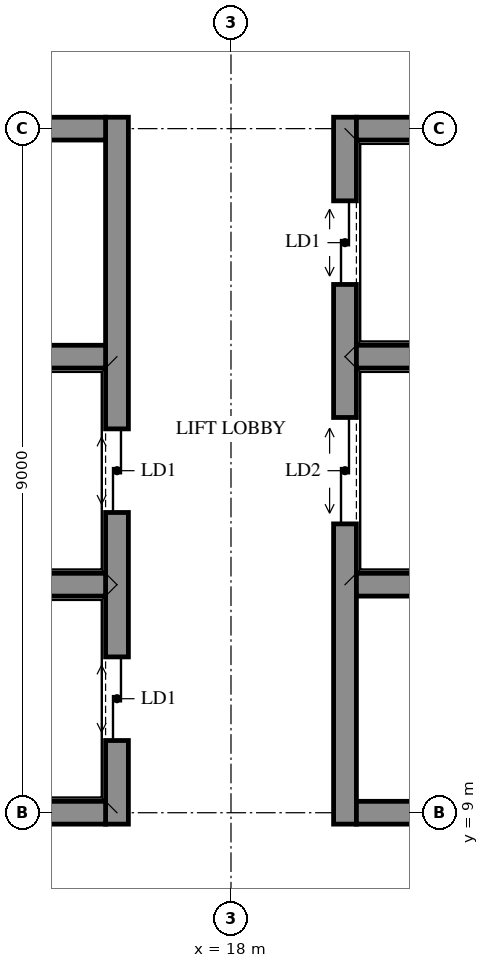
"""IFC4 building model, lengths in metres.
Left out: names, types, materials, properties, quantities, classifications, styles, units other than length and angle.
Written with IfcOpenShell. Run it as: python <this file> out.ifc"""

import sys

from ifc_helpers import new_model, si_unit, direction, frame, frame_2d, origin, place, context, subcontext, project, spatial, rectangle, extrude, element, fill, save


model = new_model("IFC4")
c1 = context("Model", 3, precision=1e-05, world=origin(), true_north=direction((0.0, 1.0)))
c2 = subcontext(c1, "Body", "Model", "MODEL_VIEW")
j1 = project(units=[si_unit("LENGTHUNIT", "METRE"), si_unit("PLANEANGLEUNIT", "RADIAN")], contexts=[c1])
p1 = place(None, origin())
s1 = spatial("IfcSite", under=j1, at=p1, CompositionType="ELEMENT")
p2 = place(p1, origin())
s2 = spatial("IfcBuilding", under=s1, at=p2, CompositionType="ELEMENT")
p3 = place(p2, frame((0.0, 0.0, 36.0)))
s3 = spatial("IfcBuildingStorey", under=s2, at=p3, CompositionType="ELEMENT", Elevation=36.0)
p4 = place(p3, frame((16.5, 8.85, 0.0), z_axis=(0.0, 0.0, 1.0), x_axis=(0.0, 1.0, 0.0)))
e1 = element("IfcWall", 1, at=p4, inside=s3, PredefinedType="SHEAR", context=c2, shape_type="SweptSolid", body=[
    extrude(rectangle(XDim=9.3, YDim=0.3, at=frame_2d((4.65, 0.0))), origin(), (0.0, 0.0, 1.0), 4.2),
])
p5 = place(p4, frame((1.1, 0.0, 0.0)))
e2 = element("IfcOpeningElement", 2, at=p5, cuts=e1, PredefinedType="OPENING", context=c2, shape_type="SweptSolid", body=[
    extrude(rectangle(XDim=1.1, YDim=2.1, at=frame_2d((0.55, 1.05))), frame((0.0, 0.16, 0.0), z_axis=(0.0, -1.0, 0.0), x_axis=(1.0, 0.0, 0.0)), (0.0, 0.0, 1.0), 0.32),
])
p6 = place(p4, frame((4.1, 0.0, 0.0)))
e3 = element("IfcOpeningElement", 3, at=p6, cuts=e1, PredefinedType="OPENING", context=c2, shape_type="SweptSolid", body=[
    extrude(rectangle(XDim=1.1, YDim=2.1, at=frame_2d((0.55, 1.05))), frame((0.0, 0.16, 0.0), z_axis=(0.0, -1.0, 0.0), x_axis=(1.0, 0.0, 0.0)), (0.0, 0.0, 1.0), 0.32),
])
p7 = place(p3, frame((19.5, 8.85, 0.0), z_axis=(0.0, 0.0, 1.0), x_axis=(0.0, 1.0, 0.0)))
e4 = element("IfcWall", 4, at=p7, inside=s3, PredefinedType="SHEAR", context=c2, shape_type="SweptSolid", body=[
    extrude(rectangle(XDim=9.3, YDim=0.3, at=frame_2d((4.65, 0.0))), origin(), (0.0, 0.0, 1.0), 4.2),
])
p8 = place(p7, frame((3.95, 0.0, 0.0)))
e5 = element("IfcOpeningElement", 5, at=p8, cuts=e4, PredefinedType="OPENING", context=c2, shape_type="SweptSolid", body=[
    extrude(rectangle(XDim=1.4, YDim=2.1, at=frame_2d((0.7, 1.05))), frame((0.0, 0.16, 0.0), z_axis=(0.0, -1.0, 0.0), x_axis=(1.0, 0.0, 0.0)), (0.0, 0.0, 1.0), 0.32),
])
p9 = place(p7, frame((7.1, 0.0, 0.0)))
e6 = element("IfcOpeningElement", 6, at=p9, cuts=e4, PredefinedType="OPENING", context=c2, shape_type="SweptSolid", body=[
    extrude(rectangle(XDim=1.1, YDim=2.1, at=frame_2d((0.55, 1.05))), frame((0.0, 0.16, 0.0), z_axis=(0.0, -1.0, 0.0), x_axis=(1.0, 0.0, 0.0)), (0.0, 0.0, 1.0), 0.32),
])
for number, where, z_axis, x_axis in (
    (7, (13.65, 9.0, 0.0), (0.0, 0.0, 1.0), (1.0, 0.0, 0.0)),
    (8, (19.65, 9.0, 0.0), (0.0, 0.0, 1.0), (1.0, 0.0, 0.0)),
    (9, (13.65, 12.0, 0.0), (0.0, 0.0, 1.0), (1.0, 0.0, 0.0)),
    (10, (19.65, 12.0, 0.0), (0.0, 0.0, 1.0), (1.0, 0.0, 0.0)),
    (11, (13.65, 15.0, 0.0), (0.0, 0.0, 1.0), (1.0, 0.0, 0.0)),
    (12, (19.65, 15.0, 0.0), (0.0, 0.0, 1.0), (1.0, 0.0, 0.0)),
    (13, (13.65, 18.0, 0.0), (0.0, 0.0, 1.0), (1.0, 0.0, 0.0)),
    (14, (19.65, 18.0, 0.0), (0.0, 0.0, 1.0), (1.0, 0.0, 0.0)),
):
    element("IfcWall", number, at=place(p3, frame(where, z_axis=z_axis, x_axis=x_axis)), inside=s3, PredefinedType="SHEAR", context=c2, shape_type="SweptSolid", body=[
        extrude(rectangle(XDim=2.7, YDim=0.3, at=frame_2d((1.35, 0.0))), origin(), (0.0, 0.0, 1.0), 4.2),
    ])
p10 = place(p5, origin())
e15 = element("IfcDoor", 15, at=p10, inside=s3, OperationType="DOUBLE_DOOR_SLIDING", PredefinedType="DOOR", context=c2, shape_type="SweptSolid", body=[
    extrude(rectangle(XDim=1.1, YDim=2.1, at=frame_2d((0.55, 1.05))), frame((0.0, 0.025, 0.0), z_axis=(0.0, -1.0, 0.0), x_axis=(1.0, 0.0, 0.0)), (0.0, 0.0, 1.0), 0.05),
])
fill(e2, e15)
p11 = place(p6, origin())
e16 = element("IfcDoor", 16, at=p11, inside=s3, OperationType="DOUBLE_DOOR_SLIDING", PredefinedType="DOOR", context=c2, shape_type="SweptSolid", body=[
    extrude(rectangle(XDim=1.1, YDim=2.1, at=frame_2d((0.55, 1.05))), frame((0.0, 0.025, 0.0), z_axis=(0.0, -1.0, 0.0), x_axis=(1.0, 0.0, 0.0)), (0.0, 0.0, 1.0), 0.05),
])
fill(e3, e16)
p12 = place(p8, origin())
e17 = element("IfcDoor", 17, at=p12, inside=s3, OperationType="DOUBLE_DOOR_SLIDING", PredefinedType="DOOR", context=c2, shape_type="SweptSolid", body=[
    extrude(rectangle(XDim=1.4, YDim=2.1, at=frame_2d((0.7, 1.05))), frame((0.0, 0.025, 0.0), z_axis=(0.0, -1.0, 0.0), x_axis=(1.0, 0.0, 0.0)), (0.0, 0.0, 1.0), 0.05),
])
fill(e5, e17)
p13 = place(p9, origin())
e18 = element("IfcDoor", 18, at=p13, inside=s3, OperationType="DOUBLE_DOOR_SLIDING", PredefinedType="DOOR", context=c2, shape_type="SweptSolid", body=[
    extrude(rectangle(XDim=1.1, YDim=2.1, at=frame_2d((0.55, 1.05))), frame((0.0, 0.025, 0.0), z_axis=(0.0, -1.0, 0.0), x_axis=(1.0, 0.0, 0.0)), (0.0, 0.0, 1.0), 0.05),
])
fill(e6, e18)
save(model, sys.argv[1])
